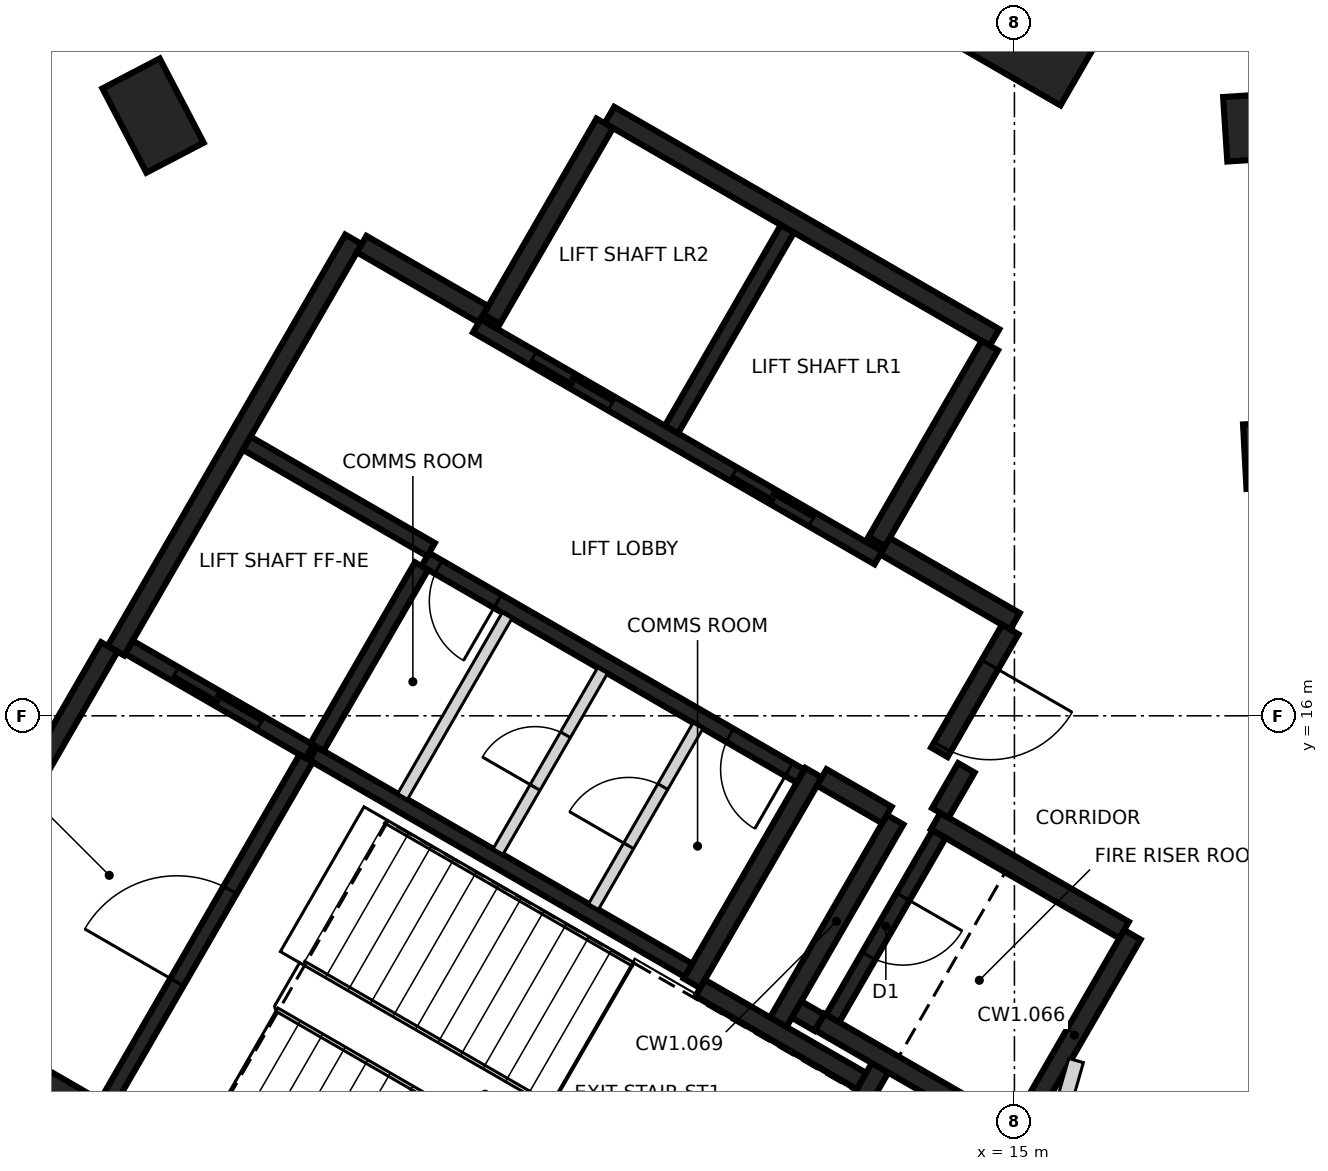
"""IFC4 building model, lengths in metres.
Left out: names, types, materials, properties, quantities, classifications, styles, units other than length and angle.
Written with IfcOpenShell. Run it as: python <this file> out.ifc"""

import sys

from ifc_helpers import new_model, si_unit, direction, frame, frame_2d, origin, origin_2d, place, context, subcontext, project, spatial, rectangle, extrude, element, fill, save


model = new_model("IFC4")
c1 = context("Model", 3, precision=1e-05, world=origin(), true_north=direction((0.0, 1.0)))
c2 = subcontext(c1, "Body", "Model", "MODEL_VIEW")
j1 = project(units=[si_unit("LENGTHUNIT", "METRE"), si_unit("PLANEANGLEUNIT", "RADIAN")], contexts=[c1])
p1 = place(None, origin())
s1 = spatial("IfcSite", under=j1, at=p1, CompositionType="ELEMENT")
p2 = place(p1, origin())
s2 = spatial("IfcBuilding", under=s1, at=p2, CompositionType="ELEMENT")
p3 = place(p2, frame((0.0, 0.0, 146.8)))
s3 = spatial("IfcBuildingStorey", under=s2, at=p3, CompositionType="ELEMENT", Elevation=146.8)
for number, where, z_axis, x_axis in (
    (1, (18.655, 19.442, -0.4), (0.0, 0.0, 1.0), (0.999, 0.054, 0.0)),
    (2, (18.397, 23.757, -0.4), (0.0, 0.0, 1.0), (0.998, 0.065, 0.0)),
    (3, (3.667, 23.896, -0.4), (0.0, 0.0, 1.0), (-0.463, 0.886, 0.0)),
):
    element("IfcColumn", number, at=place(p3, frame(where, z_axis=z_axis, x_axis=x_axis)), inside=s3, PredefinedType="COLUMN", context=c2, shape_type="SweptSolid", body=[
        extrude(rectangle(XDim=1.25, YDim=0.85, at=origin_2d()), origin(), (0.0, 0.0, 1.0), 3.6),
    ])
p4 = place(p3, frame((15.207, 26.34, -0.4), z_axis=(0.0, 0.0, 1.0), x_axis=(0.5, 0.866025403784, 0.0)))
e4 = element("IfcColumn", 4, at=p4, inside=s3, PredefinedType="COLUMN", context=c2, shape_type="SweptSolid", body=[
    extrude(rectangle(XDim=3.6, YDim=3.0, at=origin_2d()), origin(), (0.0, 0.0, 1.0), 3.6),
])
p5 = place(p3, frame((10.42, 6.498, 0.0), z_axis=(0.0, 0.0, 1.0), x_axis=(-0.866021906294, 0.500006057782, 0.0)))
e5 = element("IfcWall", 5, at=p5, inside=s3, PredefinedType="SHEAR", context=c2, shape_type="SweptSolid", body=[
    extrude(rectangle(XDim=11.55, YDim=0.25, at=frame_2d((5.775, 0.0))), origin(), (0.0, 0.0, 1.0), 3.2),
])
p6 = place(p5, frame((10.025, 0.0, 0.0)))
e6 = element("IfcOpeningElement", 6, at=p6, cuts=e5, PredefinedType="OPENING", context=c2, shape_type="SweptSolid", body=[
    extrude(rectangle(XDim=1.2, YDim=2.1, at=frame_2d((0.6, 1.05))), frame((0.0, 0.135, 0.0), z_axis=(0.0, -1.0, 0.0), x_axis=(1.0, 0.0, 0.0)), (0.0, 0.0, 1.0), 0.27),
])
p7 = place(p5, frame((8.725, 0.0, 0.0)))
e7 = element("IfcOpeningElement", 7, at=p7, cuts=e5, PredefinedType="OPENING", context=c2, shape_type="SweptSolid", body=[
    extrude(rectangle(XDim=1.2, YDim=2.1, at=frame_2d((0.6, 1.05))), frame((0.0, 0.135, 0.0), z_axis=(0.0, -1.0, 0.0), x_axis=(1.0, 0.0, 0.0)), (0.0, 0.0, 1.0), 0.27),
])
p8 = place(p3, frame((3.179, 16.856, 0.0), z_axis=(0.0, 0.0, 1.0), x_axis=(0.500004234368, 0.866022959057, 0.0)))
e8 = element("IfcWall", 8, at=p8, inside=s3, PredefinedType="SHEAR", context=c2, shape_type="SweptSolid", body=[
    extrude(rectangle(XDim=6.25, YDim=0.25, at=frame_2d((3.125, 0.0))), origin(), (0.0, 0.0, 1.0), 3.2),
])
p9 = place(p3, frame((9.673, 23.903, 0.0), z_axis=(0.0, 0.0, 1.0), x_axis=(0.86603616409, -0.499981362141, 0.0)))
e9 = element("IfcWall", 9, at=p9, inside=s3, PredefinedType="SHEAR", context=c2, shape_type="SweptSolid", body=[
    extrude(rectangle(XDim=5.85, YDim=0.25, at=frame_2d((2.925, 0.0))), origin(), (0.0, 0.0, 1.0), 3.2),
])
p10 = place(p3, frame((0.48, 12.381, 0.0), z_axis=(0.0, 0.0, 1.0), x_axis=(0.49999885962, 0.866026062182, 0.0)))
e10 = element("IfcWall", 10, at=p10, inside=s3, PredefinedType="SHEAR", context=c2, shape_type="SweptSolid", body=[
    extrude(rectangle(XDim=5.225, YDim=0.25, at=frame_2d((2.612, 0.0))), origin(), (0.0, 0.0, 1.0), 3.2),
])
p11 = place(p3, frame((13.238, 11.378, 0.0), z_axis=(0.0, 0.0, 1.0), x_axis=(-0.500008851346, -0.866020293397, 0.0)))
e11 = element("IfcWall", 11, at=p11, inside=s3, PredefinedType="SHEAR", context=c2, shape_type="SweptSolid", body=[
    extrude(rectangle(XDim=5.51, YDim=0.25, at=frame_2d((2.755, 0.0))), origin(), (0.0, 0.0, 1.0), 3.2),
])
p12 = place(p3, frame((12.357, 15.252, 0.0), z_axis=(0.0, 0.0, 1.0), x_axis=(-0.500028443584, -0.866008981251, 0.0)))
e12 = element("IfcWall", 12, at=p12, inside=s3, PredefinedType="SHEAR", context=c2, shape_type="SweptSolid", body=[
    extrude(rectangle(XDim=3.2, YDim=0.25, at=frame_2d((1.6, 0.0))), origin(), (0.0, 0.0, 1.0), 3.2),
])
for number, where, z_axis, x_axis in (
    (13, (8.123, 21.219, 0.0), (0.0, 0.0, 1.0), (0.5, 0.866, 0.0)),
    (14, (14.676, 20.87, 0.0), (0.0, 0.0, 1.0), (-0.5, -0.866, 0.0)),
):
    element("IfcWall", number, at=place(p3, frame(where, z_axis=z_axis, x_axis=x_axis)), inside=s3, PredefinedType="SHEAR", context=c2, shape_type="SweptSolid", body=[
        extrude(rectangle(XDim=2.975, YDim=0.25, at=frame_2d((1.487, 0.0))), origin(), (0.0, 0.0, 1.0), 3.2),
    ])
p13 = place(p3, frame((16.552, 13.119, 0.0), z_axis=(0.0, 0.0, 1.0), x_axis=(-0.499978833458, -0.866037623948, 0.0)))
e15 = element("IfcWall", 15, at=p13, inside=s3, PredefinedType="SHEAR", context=c2, shape_type="SweptSolid", body=[
    extrude(rectangle(XDim=3.05, YDim=0.25, at=frame_2d((1.525, 0.0))), origin(), (0.0, 0.0, 1.0), 3.2),
])
p14 = place(p3, frame((14.918, 10.54, 0.0), z_axis=(0.0, 0.0, 1.0), x_axis=(-0.866063538972, 0.499933942099, 0.0)))
e16 = element("IfcWall", 16, at=p14, inside=s3, PredefinedType="SHEAR", context=c2, shape_type="SweptSolid", body=[
    extrude(rectangle(XDim=2.865, YDim=0.25, at=frame_2d((1.432, 0.0))), origin(), (0.0, 0.0, 1.0), 3.2),
])
p15 = place(p3, frame((13.963, 14.614, 0.0), z_axis=(0.0, 0.0, 1.0), x_axis=(0.866042235819, -0.499970844928, 0.0)))
e17 = element("IfcWall", 17, at=p15, inside=s3, PredefinedType="SHEAR", context=c2, shape_type="SweptSolid", body=[
    extrude(rectangle(XDim=2.865, YDim=0.25, at=frame_2d((1.432, 0.0))), origin(), (0.0, 0.0, 1.0), 3.2),
])
p16 = place(p3, frame((11.888, 11.961, 0.0), z_axis=(0.0, 0.0, 1.0), x_axis=(0.500003324108, 0.866023484601, 0.0)))
e18 = element("IfcWall", 18, at=p16, inside=s3, PredefinedType="SHEAR", context=c2, shape_type="SweptSolid", body=[
    extrude(rectangle(XDim=3.085, YDim=0.25, at=frame_2d((1.542, 0.0))), origin(), (0.0, 0.0, 1.0), 3.2),
])
p17 = place(p3, frame((10.865, 12.418, 0.0), z_axis=(0.0, 0.0, 1.0), x_axis=(0.866026229868, -0.499998569178, 0.0)))
e19 = element("IfcWall", 19, at=p17, inside=s3, PredefinedType="SHEAR", context=c2, shape_type="SweptSolid", body=[
    extrude(rectangle(XDim=2.449, YDim=0.25, at=frame_2d((1.225, 0.0))), origin(), (0.0, 0.0, 1.0), 3.2),
])
p18 = place(p3, frame((13.297, 18.231, 0.0), z_axis=(0.0, 0.0, 1.0), x_axis=(0.866043531843, -0.499968599967, 0.0)))
e20 = element("IfcWall", 20, at=p18, inside=s3, PredefinedType="SHEAR", context=c2, shape_type="SweptSolid", body=[
    extrude(rectangle(XDim=1.975, YDim=0.25, at=frame_2d((0.987, 0.0))), origin(), (0.0, 0.0, 1.0), 3.2),
])
p19 = place(p3, frame((6.413, 22.206, 0.0), z_axis=(0.0, 0.0, 1.0), x_axis=(0.866016279763, -0.500015802937, 0.0)))
e21 = element("IfcWall", 21, at=p19, inside=s3, PredefinedType="SHEAR", context=c2, shape_type="SweptSolid", body=[
    extrude(rectangle(XDim=1.849, YDim=0.25, at=frame_2d((0.925, 0.0))), origin(), (0.0, 0.0, 1.0), 3.2),
])
p20 = place(p3, frame((14.945, 17.135, 0.0), z_axis=(0.0, 0.0, 1.0), x_axis=(-0.499983108224, -0.866035156036, 0.0)))
e22 = element("IfcWall", 22, at=p20, inside=s3, PredefinedType="SHEAR", context=c2, shape_type="SweptSolid", body=[
    extrude(rectangle(XDim=1.865, YDim=0.25, at=frame_2d((0.932, 0.0))), origin(), (0.0, 0.0, 1.0), 3.2),
])
p21 = place(p20, frame((0.535, 0.0, 0.0)))
e23 = element("IfcOpeningElement", 23, at=p21, cuts=e22, PredefinedType="OPENING", context=c2, shape_type="SweptSolid", body=[
    extrude(rectangle(XDim=1.25, YDim=2.1, at=frame_2d((0.625, 1.05))), frame((0.0, 0.135, 0.0), z_axis=(0.0, -1.0, 0.0), x_axis=(1.0, 0.0, 0.0)), (0.0, 0.0, 1.0), 0.27),
])
p22 = place(p3, frame((13.322, 14.695, 0.0), z_axis=(0.0, 0.0, 1.0), x_axis=(-0.866017078145, 0.500014420154, 0.0)))
e24 = element("IfcWall", 24, at=p22, inside=s3, PredefinedType="SHEAR", context=c2, shape_type="SweptSolid", body=[
    extrude(rectangle(XDim=0.989, YDim=0.25, at=frame_2d((0.495, 0.0))), origin(), (0.0, 0.0, 1.0), 3.2),
])
p23 = place(p3, frame((14.368, 15.315, 0.0), z_axis=(0.0, 0.0, 1.0), x_axis=(-0.499897359611, -0.866084655132, 0.0)))
e25 = element("IfcWall", 25, at=p23, inside=s3, PredefinedType="SHEAR", context=c2, shape_type="SweptSolid", body=[
    extrude(rectangle(XDim=0.685, YDim=0.25, at=frame_2d((0.342, 0.0))), origin(), (0.0, 0.0, 1.0), 3.2),
])
p24 = place(p3, frame((12.433, 11.964, 0.0), z_axis=(0.0, 0.0, 1.0), x_axis=(-0.866055875208, 0.499947218231, 0.0)))
e26 = element("IfcWall", 26, at=p24, inside=s3, PredefinedType="SHEAR", context=c2, shape_type="SweptSolid", body=[
    extrude(rectangle(XDim=0.345, YDim=0.25, at=frame_2d((0.172, 0.0))), origin(), (0.0, 0.0, 1.0), 3.2),
])
p25 = place(p3, frame((13.21, 18.08, 0.0), z_axis=(0.0, 0.0, 1.0), x_axis=(-0.866030299012, 0.499991521122, 0.0)))
e27 = element("IfcWall", 27, at=p25, inside=s3, PredefinedType="SHEAR", context=c2, shape_type="SweptSolid", body=[
    extrude(rectangle(XDim=6.1, YDim=0.2, at=frame_2d((3.05, 0.0))), origin(), (0.0, 0.0, 1.0), 3.2),
])
p26 = place(p25, frame((1.0, 0.0, 0.0)))
e28 = element("IfcOpeningElement", 28, at=p26, cuts=e27, PredefinedType="OPENING", context=c2, shape_type="SweptSolid", body=[
    extrude(rectangle(XDim=1.2, YDim=2.1, at=frame_2d((0.6, 1.05))), frame((0.0, 0.11, 0.0), z_axis=(0.0, -1.0, 0.0), x_axis=(1.0, 0.0, 0.0)), (0.0, 0.0, 1.0), 0.22),
])
p27 = place(p25, frame((4.05, 0.0, 0.0)))
e29 = element("IfcOpeningElement", 29, at=p27, cuts=e27, PredefinedType="OPENING", context=c2, shape_type="SweptSolid", body=[
    extrude(rectangle(XDim=1.2, YDim=2.1, at=frame_2d((0.6, 1.05))), frame((0.0, 0.11, 0.0), z_axis=(0.0, -1.0, 0.0), x_axis=(1.0, 0.0, 0.0)), (0.0, 0.0, 1.0), 0.22),
])
p28 = place(p3, frame((5.775, 15.502, 0.0), z_axis=(0.0, 0.0, 1.0), x_axis=(0.866020080793, -0.500009219579, 0.0)))
e30 = element("IfcWall", 30, at=p28, inside=s3, PredefinedType="SHEAR", context=c2, shape_type="SweptSolid", body=[
    extrude(rectangle(XDim=5.699, YDim=0.2, at=frame_2d((2.85, 0.0))), origin(), (0.0, 0.0, 1.0), 3.2),
])
p29 = place(p3, frame((12.185, 15.207, 0.0), z_axis=(0.0, 0.0, 1.0), x_axis=(-0.866020080793, 0.500009219579, 0.0)))
e31 = element("IfcWall", 31, at=p29, inside=s3, PredefinedType="SHEAR", context=c2, shape_type="SweptSolid", body=[
    extrude(rectangle(XDim=5.699, YDim=0.2, at=frame_2d((2.85, 0.0))), origin(), (0.0, 0.0, 1.0), 3.2),
])
p30 = place(p29, frame((0.174, 0.0, 0.0)))
e32 = element("IfcOpeningElement", 32, at=p30, cuts=e31, PredefinedType="OPENING", context=c2, shape_type="SweptSolid", body=[
    extrude(rectangle(XDim=0.9, YDim=2.1, at=frame_2d((0.45, 1.05))), frame((0.0, 0.11, 0.0), z_axis=(0.0, -1.0, 0.0), x_axis=(1.0, 0.0, 0.0)), (0.0, 0.0, 1.0), 0.22),
])
p31 = place(p29, frame((4.599, 0.0, 0.0)))
e33 = element("IfcOpeningElement", 33, at=p31, cuts=e31, PredefinedType="OPENING", context=c2, shape_type="SweptSolid", body=[
    extrude(rectangle(XDim=0.9, YDim=2.1, at=frame_2d((0.45, 1.05))), frame((0.0, 0.11, 0.0), z_axis=(0.0, -1.0, 0.0), x_axis=(1.0, 0.0, 0.0)), (0.0, 0.0, 1.0), 0.22),
])
p32 = place(p3, frame((3.057, 10.895, 0.0), z_axis=(0.0, 0.0, 1.0), x_axis=(0.499989418164, 0.866031513124, 0.0)))
e34 = element("IfcWall", 34, at=p32, inside=s3, PredefinedType="SHEAR", context=c2, shape_type="SweptSolid", body=[
    extrude(rectangle(XDim=5.251, YDim=0.2, at=frame_2d((2.625, 0.0))), origin(), (0.0, 0.0, 1.0), 3.2),
])
p33 = place(p32, frame((1.849, 0.0, 0.0)))
e35 = element("IfcOpeningElement", 35, at=p33, cuts=e34, PredefinedType="OPENING", context=c2, shape_type="SweptSolid", body=[
    extrude(rectangle(XDim=1.4, YDim=2.1, at=frame_2d((0.7, 1.05))), frame((0.0, 0.11, 0.0), z_axis=(0.0, -1.0, 0.0), x_axis=(1.0, 0.0, 0.0)), (0.0, 0.0, 1.0), 0.22),
])
p34 = place(p3, frame((10.489, 19.767, 0.0), z_axis=(0.0, 0.0, 1.0), x_axis=(0.499946628782, 0.866056215479, 0.0)))
e36 = element("IfcWall", 36, at=p34, inside=s3, PredefinedType="SHEAR", context=c2, shape_type="SweptSolid", body=[
    extrude(rectangle(XDim=3.048, YDim=0.2, at=frame_2d((1.524, 0.0))), origin(), (0.0, 0.0, 1.0), 3.2),
])
p35 = place(p3, frame((14.008, 14.442, 0.0), z_axis=(0.0, 0.0, 1.0), x_axis=(-0.499986818241, -0.866033014143, 0.0)))
e37 = element("IfcWall", 37, at=p35, inside=s3, PredefinedType="SHEAR", context=c2, shape_type="SweptSolid", body=[
    extrude(rectangle(XDim=2.798, YDim=0.2, at=frame_2d((1.399, 0.0))), origin(), (0.0, 0.0, 1.0), 3.2),
])
p36 = place(p35, frame((0.949, 0.0, 0.0)))
e38 = element("IfcOpeningElement", 38, at=p36, cuts=e37, PredefinedType="OPENING", context=c2, shape_type="SweptSolid", body=[
    extrude(rectangle(XDim=0.9, YDim=2.1, at=frame_2d((0.45, 1.05))), frame((0.0, 0.11, 0.0), z_axis=(0.0, -1.0, 0.0), x_axis=(1.0, 0.0, 0.0)), (0.0, 0.0, 1.0), 0.22),
])
p37 = place(p3, frame((7.199, 17.97, 0.0), z_axis=(0.0, 0.0, 1.0), x_axis=(-0.499968400327, -0.866043647095, 0.0)))
e39 = element("IfcWall", 39, at=p37, inside=s3, PredefinedType="SHEAR", context=c2, shape_type="SweptSolid", body=[
    extrude(rectangle(XDim=2.75, YDim=0.2, at=frame_2d((1.375, 0.0))), origin(), (0.0, 0.0, 1.0), 3.2),
])
p38 = place(p3, frame((5.725, 15.531, 0.0), z_axis=(0.0, 0.0, 1.0), x_axis=(-0.866037306777, 0.499979382845, 0.0)))
e40 = element("IfcWall", 40, at=p38, inside=s3, PredefinedType="SHEAR", context=c2, shape_type="SweptSolid", body=[
    extrude(rectangle(XDim=2.742, YDim=0.2, at=frame_2d((1.371, 0.0))), origin(), (0.0, 0.0, 1.0), 3.2),
])
p39 = place(p38, frame((0.743, 0.0, 0.0)))
e41 = element("IfcOpeningElement", 41, at=p39, cuts=e40, PredefinedType="OPENING", context=c2, shape_type="SweptSolid", body=[
    extrude(rectangle(XDim=1.3, YDim=2.1, at=frame_2d((0.65, 1.05))), frame((0.0, 0.11, 0.0), z_axis=(0.0, -1.0, 0.0), x_axis=(1.0, 0.0, 0.0)), (0.0, 0.0, 1.0), 0.22),
])
p40 = place(p3, frame((4.901, 19.586, 0.0), z_axis=(0.0, 0.0, 1.0), x_axis=(0.866022890907, -0.500004352405, 0.0)))
e42 = element("IfcWall", 42, at=p40, inside=s3, PredefinedType="SHEAR", context=c2, shape_type="SweptSolid", body=[
    extrude(rectangle(XDim=2.799, YDim=0.2, at=frame_2d((1.399, 0.0))), origin(), (0.0, 0.0, 1.0), 3.2),
])
p41 = place(p3, frame((9.462, 13.489, 0.0), z_axis=(0.0, 0.0, 1.0), x_axis=(0.50002746344, 0.86600954718, 0.0)))
e43 = element("IfcWall", 43, at=p41, inside=s3, PredefinedType="PARTITIONING", context=c2, shape_type="SweptSolid", body=[
    extrude(rectangle(XDim=2.748, YDim=0.15, at=frame_2d((1.374, 0.0))), origin(), (0.0, 0.0, 1.0), 3.2),
])
p42 = place(p41, frame((0.924, 0.0, 0.0)))
e44 = element("IfcOpeningElement", 44, at=p42, cuts=e43, PredefinedType="OPENING", context=c2, shape_type="SweptSolid", body=[
    extrude(rectangle(XDim=0.9, YDim=2.1, at=frame_2d((0.45, 1.05))), frame((0.0, 0.085, 0.0), z_axis=(0.0, -1.0, 0.0), x_axis=(1.0, 0.0, 0.0)), (0.0, 0.0, 1.0), 0.17),
])
p43 = place(p3, frame((8.207, 14.214, 0.0), z_axis=(0.0, 0.0, 1.0), x_axis=(0.499922376475, 0.866070215109, 0.0)))
e45 = element("IfcWall", 45, at=p43, inside=s3, PredefinedType="PARTITIONING", context=c2, shape_type="SweptSolid", body=[
    extrude(rectangle(XDim=2.749, YDim=0.15, at=frame_2d((1.374, 0.0))), origin(), (0.0, 0.0, 1.0), 3.2),
])
p44 = place(p43, frame((0.974, 0.0, 0.0)))
e46 = element("IfcOpeningElement", 46, at=p44, cuts=e45, PredefinedType="OPENING", context=c2, shape_type="SweptSolid", body=[
    extrude(rectangle(XDim=0.8, YDim=2.1, at=frame_2d((0.4, 1.05))), frame((0.0, 0.085, 0.0), z_axis=(0.0, -1.0, 0.0), x_axis=(1.0, 0.0, 0.0)), (0.0, 0.0, 1.0), 0.17),
])
p45 = place(p3, frame((6.951, 14.939, 0.0), z_axis=(0.0, 0.0, 1.0), x_axis=(0.50002746344, 0.86600954718, 0.0)))
e47 = element("IfcWall", 47, at=p45, inside=s3, PredefinedType="PARTITIONING", context=c2, shape_type="SweptSolid", body=[
    extrude(rectangle(XDim=2.748, YDim=0.15, at=frame_2d((1.374, 0.0))), origin(), (0.0, 0.0, 1.0), 3.2),
])
p46 = place(p3, frame((15.52, 10.445, 0.0), z_axis=(0.0, 0.0, 1.0), x_axis=(0.274143458758, 0.961688808306, 0.0)))
e48 = element("IfcWall", 48, at=p46, inside=s3, PredefinedType="PARTITIONING", context=c2, shape_type="SweptSolid", body=[
    extrude(rectangle(XDim=1.061, YDim=0.2, at=frame_2d((0.53, 0.0))), origin(), (0.0, 0.0, 1.0), 3.2),
])
p47 = place(p39, origin())
e49 = element("IfcDoor", 49, at=p47, inside=s3, OperationType="SLIDING_TO_RIGHT", PredefinedType="DOOR", context=c2, shape_type="SweptSolid", body=[
    extrude(rectangle(XDim=1.3, YDim=2.1, at=frame_2d((0.65, 1.05))), frame((0.0, 0.025, 0.0), z_axis=(0.0, -1.0, 0.0), x_axis=(1.0, 0.0, 0.0)), (0.0, 0.0, 1.0), 0.05),
])
fill(e41, e49)
p48 = place(p26, origin())
e50 = element("IfcDoor", 50, at=p48, inside=s3, OperationType="DOUBLE_DOOR_SLIDING", PredefinedType="DOOR", context=c2, shape_type="SweptSolid", body=[
    extrude(rectangle(XDim=1.2, YDim=2.1, at=frame_2d((0.6, 1.05))), frame((0.0, 0.025, 0.0), z_axis=(0.0, -1.0, 0.0), x_axis=(1.0, 0.0, 0.0)), (0.0, 0.0, 1.0), 0.05),
])
fill(e28, e50)
p49 = place(p27, origin())
e51 = element("IfcDoor", 51, at=p49, inside=s3, OperationType="DOUBLE_DOOR_SLIDING", PredefinedType="DOOR", context=c2, shape_type="SweptSolid", body=[
    extrude(rectangle(XDim=1.2, YDim=2.1, at=frame_2d((0.6, 1.05))), frame((0.0, 0.025, 0.0), z_axis=(0.0, -1.0, 0.0), x_axis=(1.0, 0.0, 0.0)), (0.0, 0.0, 1.0), 0.05),
])
fill(e29, e51)
p50 = place(p21, origin())
e52 = element("IfcDoor", 52, at=p50, inside=s3, OperationType="SINGLE_SWING_LEFT", PredefinedType="DOOR", context=c2, shape_type="SweptSolid", body=[
    extrude(rectangle(XDim=1.25, YDim=2.1, at=frame_2d((0.625, 1.05))), frame((0.0, 0.025, 0.0), z_axis=(0.0, -1.0, 0.0), x_axis=(1.0, 0.0, 0.0)), (0.0, 0.0, 1.0), 0.05),
])
fill(e23, e52)
p51 = place(p7, origin())
e53 = element("IfcDoor", 53, at=p51, inside=s3, OperationType="SINGLE_SWING_RIGHT", PredefinedType="DOOR", context=c2, shape_type="SweptSolid", body=[
    extrude(rectangle(XDim=1.2, YDim=2.1, at=frame_2d((0.6, 1.05))), frame((0.0, 0.025, 0.0), z_axis=(0.0, -1.0, 0.0), x_axis=(1.0, 0.0, 0.0)), (0.0, 0.0, 1.0), 0.05),
])
fill(e7, e53)
p52 = place(p33, origin())
e54 = element("IfcDoor", 54, at=p52, inside=s3, OperationType="SINGLE_SWING_RIGHT", PredefinedType="DOOR", context=c2, shape_type="SweptSolid", body=[
    extrude(rectangle(XDim=1.4, YDim=2.1, at=frame_2d((0.7, 1.05))), frame((0.0, 0.025, 0.0), z_axis=(0.0, -1.0, 0.0), x_axis=(1.0, 0.0, 0.0)), (0.0, 0.0, 1.0), 0.05),
])
fill(e35, e54)
p53 = place(p30, origin())
e55 = element("IfcDoor", 55, at=p53, inside=s3, OperationType="SINGLE_SWING_LEFT", PredefinedType="DOOR", context=c2, shape_type="SweptSolid", body=[
    extrude(rectangle(XDim=0.9, YDim=2.1, at=frame_2d((0.45, 1.05))), frame((0.0, 0.025, 0.0), z_axis=(0.0, -1.0, 0.0), x_axis=(1.0, 0.0, 0.0)), (0.0, 0.0, 1.0), 0.05),
])
fill(e32, e55)
p54 = place(p42, origin())
e56 = element("IfcDoor", 56, at=p54, inside=s3, OperationType="SINGLE_SWING_RIGHT", PredefinedType="DOOR", context=c2, shape_type="SweptSolid", body=[
    extrude(rectangle(XDim=0.9, YDim=2.1, at=frame_2d((0.45, 1.05))), frame((0.0, 0.025, 0.0), z_axis=(0.0, -1.0, 0.0), x_axis=(1.0, 0.0, 0.0)), (0.0, 0.0, 1.0), 0.05),
])
fill(e44, e56)
p55 = place(p44, origin())
e57 = element("IfcDoor", 57, at=p55, inside=s3, OperationType="SINGLE_SWING_LEFT", PredefinedType="DOOR", context=c2, shape_type="SweptSolid", body=[
    extrude(rectangle(XDim=0.8, YDim=2.1, at=frame_2d((0.4, 1.05))), frame((0.0, 0.025, 0.0), z_axis=(0.0, -1.0, 0.0), x_axis=(1.0, 0.0, 0.0)), (0.0, 0.0, 1.0), 0.05),
])
fill(e46, e57)
p56 = place(p31, origin())
e58 = element("IfcDoor", 58, at=p56, inside=s3, OperationType="SINGLE_SWING_RIGHT", PredefinedType="DOOR", context=c2, shape_type="SweptSolid", body=[
    extrude(rectangle(XDim=0.9, YDim=2.1, at=frame_2d((0.45, 1.05))), frame((0.0, 0.025, 0.0), z_axis=(0.0, -1.0, 0.0), x_axis=(1.0, 0.0, 0.0)), (0.0, 0.0, 1.0), 0.05),
])
fill(e33, e58)
p57 = place(p36, origin())
e59 = element("IfcDoor", 59, at=p57, inside=s3, OperationType="SINGLE_SWING_LEFT", PredefinedType="DOOR", context=c2, shape_type="SweptSolid", body=[
    extrude(rectangle(XDim=0.9, YDim=2.1, at=frame_2d((0.45, 1.05))), frame((0.0, 0.025, 0.0), z_axis=(0.0, -1.0, 0.0), x_axis=(1.0, 0.0, 0.0)), (0.0, 0.0, 1.0), 0.05),
])
fill(e38, e59)
save(model, sys.argv[1])
